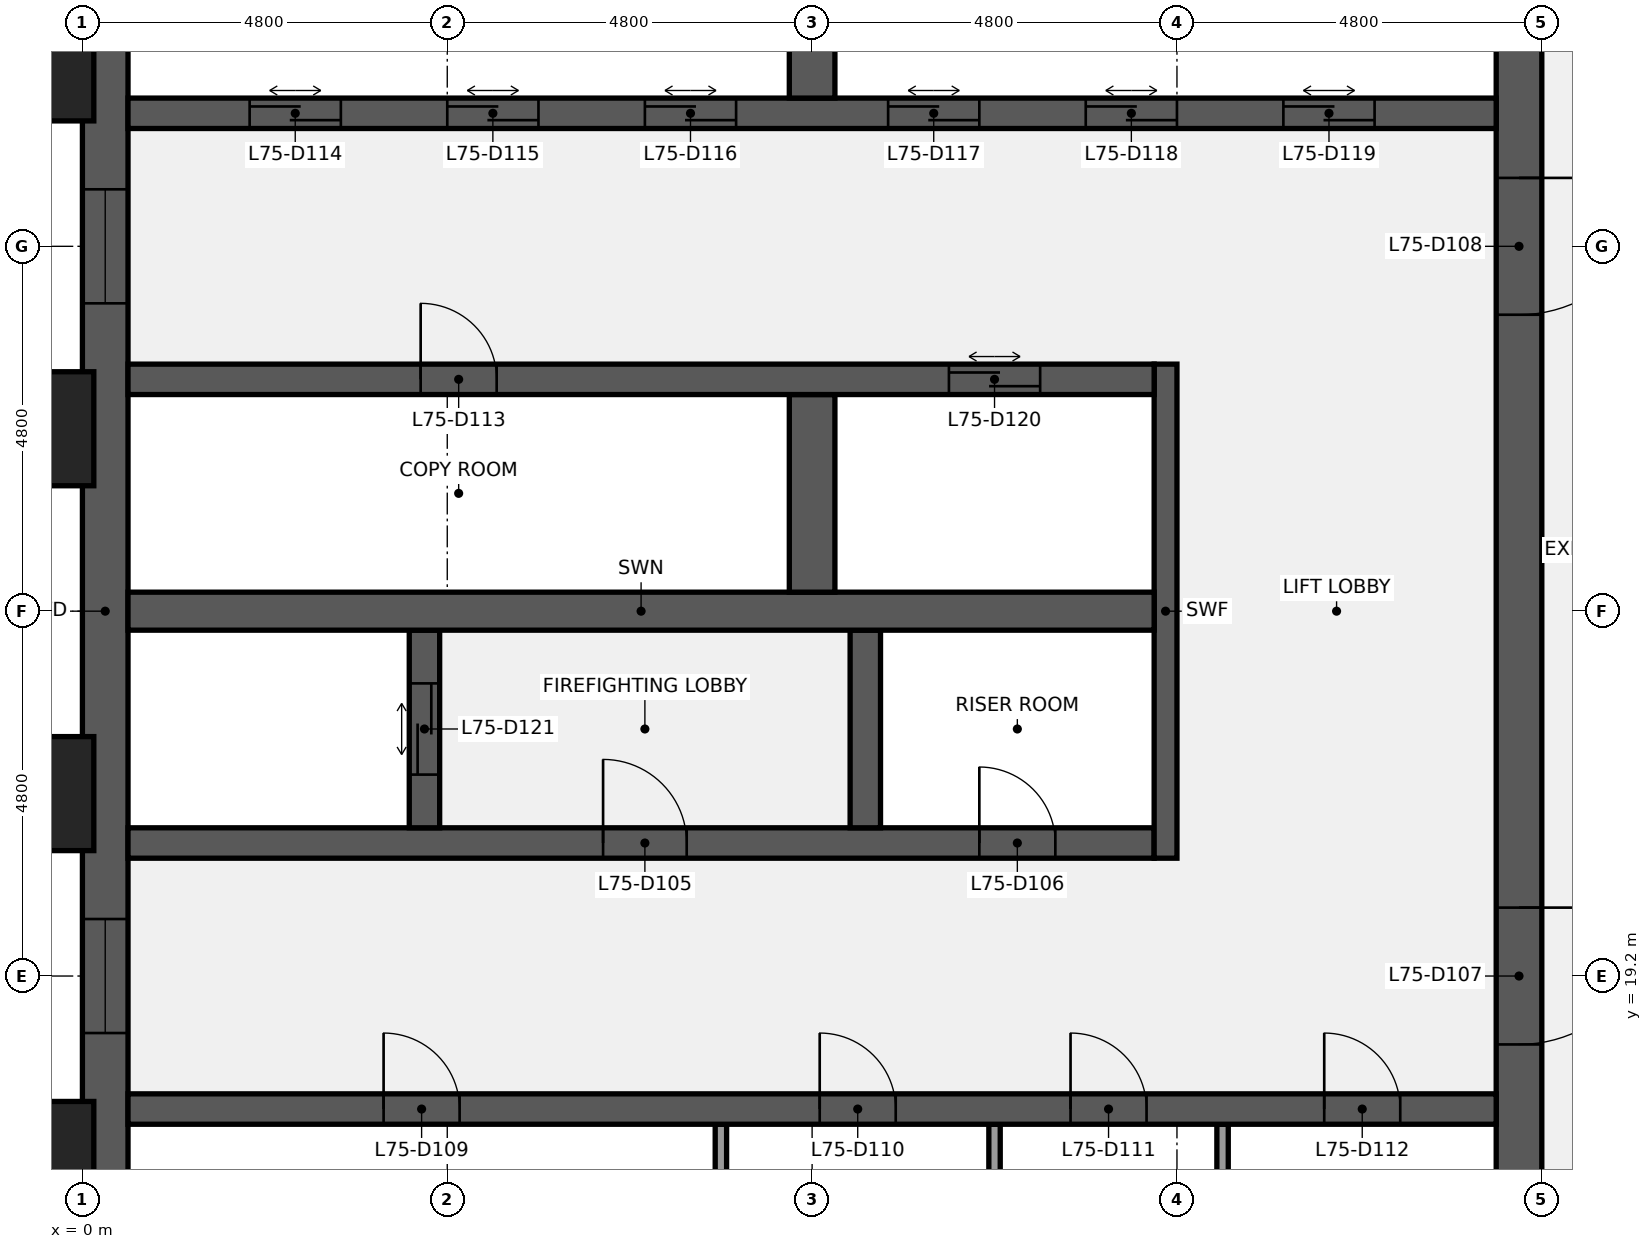
"""IFC4 building model, lengths in metres.
Left out: names, types, materials, properties, quantities, classifications, styles, units other than length and angle.
Written with IfcOpenShell. Run it as: python <this file> out.ifc"""

import sys

from ifc_helpers import new_model, si_unit, direction, frame, frame_2d, origin, origin_2d, place, context, subcontext, project, spatial, rectangle, extrude, element, fill, save


model = new_model("IFC4")
c1 = context("Model", 3, precision=1e-05, world=origin(), true_north=direction((0.0, 1.0)))
c2 = subcontext(c1, "Body", "Model", "MODEL_VIEW")
j1 = project(units=[si_unit("LENGTHUNIT", "METRE"), si_unit("PLANEANGLEUNIT", "RADIAN")], contexts=[c1])
p1 = place(None, origin())
s1 = spatial("IfcSite", under=j1, at=p1, CompositionType="ELEMENT")
p2 = place(p1, origin())
s2 = spatial("IfcBuilding", under=s1, at=p2, CompositionType="ELEMENT")
p3 = place(p2, frame((0.0, 0.0, 338.3)))
s3 = spatial("IfcBuildingStorey", under=s2, at=p3, CompositionType="ELEMENT", Elevation=338.3)
p4 = place(p3, frame((0.3, 9.6, 0.0), z_axis=(0.0, 0.0, 1.0), x_axis=(0.0, 1.0, 0.0)))
e1 = element("IfcWall", 1, at=p4, inside=s3, PredefinedType="SHEAR", context=c2, shape_type="SweptSolid", body=[
    extrude(rectangle(XDim=28.8, YDim=0.6, at=frame_2d((14.4, 0.0))), origin(), (0.0, 0.0, 1.0), 3.84),
])
p5 = place(p4, frame((8.85, 0.0, 0.9)))
e2 = element("IfcOpeningElement", 2, at=p5, cuts=e1, PredefinedType="OPENING", context=c2, shape_type="SweptSolid", body=[
    extrude(rectangle(XDim=1.5, YDim=1.5, at=frame_2d((0.75, 0.75))), frame((0.0, 0.31, 0.0), z_axis=(0.0, -1.0, 0.0), x_axis=(1.0, 0.0, 0.0)), (0.0, 0.0, 1.0), 0.62),
])
p6 = place(p4, frame((18.45, 0.0, 0.9)))
e3 = element("IfcOpeningElement", 3, at=p6, cuts=e1, PredefinedType="OPENING", context=c2, shape_type="SweptSolid", body=[
    extrude(rectangle(XDim=1.5, YDim=1.5, at=frame_2d((0.75, 0.75))), frame((0.0, 0.31, 0.0), z_axis=(0.0, -1.0, 0.0), x_axis=(1.0, 0.0, 0.0)), (0.0, 0.0, 1.0), 0.62),
])
p7 = place(p3, frame((18.9, 38.4, 0.0), z_axis=(0.0, 0.0, 1.0), x_axis=(0.0, -1.0, 0.0)))
e4 = element("IfcWall", 4, at=p7, inside=s3, PredefinedType="SHEAR", context=c2, shape_type="SweptSolid", body=[
    extrude(rectangle(XDim=28.8, YDim=0.6, at=frame_2d((14.4, 0.0))), origin(), (0.0, 0.0, 1.0), 3.84),
])
p8 = place(p7, frame((18.3, 0.0, 0.0)))
e5 = element("IfcOpeningElement", 5, at=p8, cuts=e4, PredefinedType="OPENING", context=c2, shape_type="SweptSolid", body=[
    extrude(rectangle(XDim=1.8, YDim=2.1, at=frame_2d((0.9, 1.05))), frame((0.0, 0.31, 0.0), z_axis=(0.0, -1.0, 0.0), x_axis=(1.0, 0.0, 0.0)), (0.0, 0.0, 1.0), 0.62),
])
p9 = place(p7, frame((8.7, 0.0, 0.0)))
e6 = element("IfcOpeningElement", 6, at=p9, cuts=e4, PredefinedType="OPENING", context=c2, shape_type="SweptSolid", body=[
    extrude(rectangle(XDim=1.8, YDim=2.1, at=frame_2d((0.9, 1.05))), frame((0.0, 0.31, 0.0), z_axis=(0.0, -1.0, 0.0), x_axis=(1.0, 0.0, 0.0)), (0.0, 0.0, 1.0), 0.62),
])
for number, where, z_axis, x_axis in (
    (7, (8.4, 14.65, 0.0), (0.0, 0.0, 1.0), (0.0, 1.0, 0.0)),
    (8, (12.0, 14.65, 0.0), (0.0, 0.0, 1.0), (0.0, 1.0, 0.0)),
    (9, (15.0, 14.65, 0.0), (0.0, 0.0, 1.0), (0.0, 1.0, 0.0)),
):
    element("IfcWall", number, at=place(p3, frame(where, z_axis=z_axis, x_axis=x_axis)), inside=s3, PredefinedType="PARTITIONING", context=c2, shape_type="SweptSolid", body=[
        extrude(rectangle(XDim=2.6, YDim=0.15, at=frame_2d((1.3, 0.0))), origin(), (0.0, 0.0, 1.0), 3.84),
    ])
p10 = place(p3, frame((0.6, 17.45, 0.0), z_axis=(0.0, 0.0, 1.0), x_axis=(1.0, 0.0, 0.0)))
e10 = element("IfcWall", 10, at=p10, inside=s3, PredefinedType="SHEAR", context=c2, shape_type="SweptSolid", body=[
    extrude(rectangle(XDim=18.0, YDim=0.4, at=frame_2d((9.0, 0.0))), origin(), (0.0, 0.0, 1.0), 3.84),
])
p11 = place(p10, frame((3.363, 0.0, 0.0)))
e11 = element("IfcOpeningElement", 11, at=p11, cuts=e10, PredefinedType="OPENING", context=c2, shape_type="SweptSolid", body=[
    extrude(rectangle(XDim=1.0, YDim=2.1, at=frame_2d((0.5, 1.05))), frame((0.0, 0.21, 0.0), z_axis=(0.0, -1.0, 0.0), x_axis=(1.0, 0.0, 0.0)), (0.0, 0.0, 1.0), 0.42),
])
p12 = place(p10, frame((9.1, 0.0, 0.0)))
e12 = element("IfcOpeningElement", 12, at=p12, cuts=e10, PredefinedType="OPENING", context=c2, shape_type="SweptSolid", body=[
    extrude(rectangle(XDim=1.0, YDim=2.1, at=frame_2d((0.5, 1.05))), frame((0.0, 0.21, 0.0), z_axis=(0.0, -1.0, 0.0), x_axis=(1.0, 0.0, 0.0)), (0.0, 0.0, 1.0), 0.42),
])
p13 = place(p10, frame((12.4, 0.0, 0.0)))
e13 = element("IfcOpeningElement", 13, at=p13, cuts=e10, PredefinedType="OPENING", context=c2, shape_type="SweptSolid", body=[
    extrude(rectangle(XDim=1.0, YDim=2.1, at=frame_2d((0.5, 1.05))), frame((0.0, 0.21, 0.0), z_axis=(0.0, -1.0, 0.0), x_axis=(1.0, 0.0, 0.0)), (0.0, 0.0, 1.0), 0.42),
])
p14 = place(p10, frame((15.738, 0.0, 0.0)))
e14 = element("IfcOpeningElement", 14, at=p14, cuts=e10, PredefinedType="OPENING", context=c2, shape_type="SweptSolid", body=[
    extrude(rectangle(XDim=1.0, YDim=2.1, at=frame_2d((0.5, 1.05))), frame((0.0, 0.21, 0.0), z_axis=(0.0, -1.0, 0.0), x_axis=(1.0, 0.0, 0.0)), (0.0, 0.0, 1.0), 0.42),
])
p15 = place(p3, frame((0.6, 20.95, 0.0), z_axis=(0.0, 0.0, 1.0), x_axis=(1.0, 0.0, 0.0)))
e15 = element("IfcWall", 15, at=p15, inside=s3, PredefinedType="SHEAR", context=c2, shape_type="SweptSolid", body=[
    extrude(rectangle(XDim=13.5, YDim=0.4, at=frame_2d((6.75, 0.0))), origin(), (0.0, 0.0, 1.0), 3.84),
])
p16 = place(p15, frame((6.25, 0.0, 0.0)))
e16 = element("IfcOpeningElement", 16, at=p16, cuts=e15, PredefinedType="OPENING", context=c2, shape_type="SweptSolid", body=[
    extrude(rectangle(XDim=1.1, YDim=2.1, at=frame_2d((0.55, 1.05))), frame((0.0, 0.21, 0.0), z_axis=(0.0, -1.0, 0.0), x_axis=(1.0, 0.0, 0.0)), (0.0, 0.0, 1.0), 0.42),
])
p17 = place(p15, frame((11.2, 0.0, 0.0)))
e17 = element("IfcOpeningElement", 17, at=p17, cuts=e15, PredefinedType="OPENING", context=c2, shape_type="SweptSolid", body=[
    extrude(rectangle(XDim=1.0, YDim=2.1, at=frame_2d((0.5, 1.05))), frame((0.0, 0.21, 0.0), z_axis=(0.0, -1.0, 0.0), x_axis=(1.0, 0.0, 0.0)), (0.0, 0.0, 1.0), 0.42),
])
p18 = place(p3, frame((14.25, 20.75, 0.0), z_axis=(0.0, 0.0, 1.0), x_axis=(0.0, 1.0, 0.0)))
e18 = element("IfcWall", 18, at=p18, inside=s3, PredefinedType="SHEAR", context=c2, shape_type="SweptSolid", body=[
    extrude(rectangle(XDim=6.5, YDim=0.3, at=frame_2d((3.25, 0.0))), origin(), (0.0, 0.0, 1.0), 3.84),
])
p19 = place(p3, frame((4.5, 21.15, 0.0), z_axis=(0.0, 0.0, 1.0), x_axis=(0.0, 1.0, 0.0)))
e19 = element("IfcWall", 19, at=p19, inside=s3, PredefinedType="SHEAR", context=c2, shape_type="SweptSolid", body=[
    extrude(rectangle(XDim=2.6, YDim=0.4, at=frame_2d((1.3, 0.0))), origin(), (0.0, 0.0, 1.0), 3.84),
])
p20 = place(p19, frame((0.7, 0.0, 0.0)))
e20 = element("IfcOpeningElement", 20, at=p20, cuts=e19, PredefinedType="OPENING", context=c2, shape_type="SweptSolid", body=[
    extrude(rectangle(XDim=1.2, YDim=2.1, at=frame_2d((0.6, 1.05))), frame((0.0, 0.21, 0.0), z_axis=(0.0, -1.0, 0.0), x_axis=(1.0, 0.0, 0.0)), (0.0, 0.0, 1.0), 0.42),
])
p21 = place(p3, frame((10.3, 21.15, 0.0), z_axis=(0.0, 0.0, 1.0), x_axis=(0.0, 1.0, 0.0)))
e21 = element("IfcWall", 21, at=p21, inside=s3, PredefinedType="SHEAR", context=c2, shape_type="SweptSolid", body=[
    extrude(rectangle(XDim=2.6, YDim=0.4, at=frame_2d((1.3, 0.0))), origin(), (0.0, 0.0, 1.0), 3.84),
])
p22 = place(p3, frame((0.6, 24.0, 0.0), z_axis=(0.0, 0.0, 1.0), x_axis=(1.0, 0.0, 0.0)))
e22 = element("IfcWall", 22, at=p22, inside=s3, PredefinedType="SHEAR", context=c2, shape_type="SweptSolid", body=[
    extrude(rectangle(XDim=13.5, YDim=0.5, at=frame_2d((6.75, 0.0))), origin(), (0.0, 0.0, 1.0), 3.84),
])
p23 = place(p3, frame((9.6, 24.25, 0.0), z_axis=(0.0, 0.0, 1.0), x_axis=(0.0, 1.0, 0.0)))
e23 = element("IfcWall", 23, at=p23, inside=s3, PredefinedType="SHEAR", context=c2, shape_type="SweptSolid", body=[
    extrude(rectangle(XDim=2.6, YDim=0.6, at=frame_2d((1.3, 0.0))), origin(), (0.0, 0.0, 1.0), 3.84),
])
p24 = place(p3, frame((0.6, 27.05, 0.0), z_axis=(0.0, 0.0, 1.0), x_axis=(1.0, 0.0, 0.0)))
e24 = element("IfcWall", 24, at=p24, inside=s3, PredefinedType="SHEAR", context=c2, shape_type="SweptSolid", body=[
    extrude(rectangle(XDim=13.5, YDim=0.4, at=frame_2d((6.75, 0.0))), origin(), (0.0, 0.0, 1.0), 3.84),
])
p25 = place(p24, frame((3.85, 0.0, 0.0)))
e25 = element("IfcOpeningElement", 25, at=p25, cuts=e24, PredefinedType="OPENING", context=c2, shape_type="SweptSolid", body=[
    extrude(rectangle(XDim=1.0, YDim=2.1, at=frame_2d((0.5, 1.05))), frame((0.0, 0.21, 0.0), z_axis=(0.0, -1.0, 0.0), x_axis=(1.0, 0.0, 0.0)), (0.0, 0.0, 1.0), 0.42),
])
p26 = place(p24, frame((10.8, 0.0, 0.0)))
e26 = element("IfcOpeningElement", 26, at=p26, cuts=e24, PredefinedType="OPENING", context=c2, shape_type="SweptSolid", body=[
    extrude(rectangle(XDim=1.2, YDim=2.1, at=frame_2d((0.6, 1.05))), frame((0.0, 0.21, 0.0), z_axis=(0.0, -1.0, 0.0), x_axis=(1.0, 0.0, 0.0)), (0.0, 0.0, 1.0), 0.42),
])
p27 = place(p3, frame((0.6, 30.55, 0.0), z_axis=(0.0, 0.0, 1.0), x_axis=(1.0, 0.0, 0.0)))
e27 = element("IfcWall", 27, at=p27, inside=s3, PredefinedType="SHEAR", context=c2, shape_type="SweptSolid", body=[
    extrude(rectangle(XDim=18.0, YDim=0.4, at=frame_2d((9.0, 0.0))), origin(), (0.0, 0.0, 1.0), 3.84),
])
p28 = place(p27, frame((1.6, 0.0, 0.0)))
e28 = element("IfcOpeningElement", 28, at=p28, cuts=e27, PredefinedType="OPENING", context=c2, shape_type="SweptSolid", body=[
    extrude(rectangle(XDim=1.2, YDim=2.1, at=frame_2d((0.6, 1.05))), frame((0.0, 0.21, 0.0), z_axis=(0.0, -1.0, 0.0), x_axis=(1.0, 0.0, 0.0)), (0.0, 0.0, 1.0), 0.42),
])
p29 = place(p27, frame((4.2, 0.0, 0.0)))
e29 = element("IfcOpeningElement", 29, at=p29, cuts=e27, PredefinedType="OPENING", context=c2, shape_type="SweptSolid", body=[
    extrude(rectangle(XDim=1.2, YDim=2.1, at=frame_2d((0.6, 1.05))), frame((0.0, 0.21, 0.0), z_axis=(0.0, -1.0, 0.0), x_axis=(1.0, 0.0, 0.0)), (0.0, 0.0, 1.0), 0.42),
])
p30 = place(p27, frame((6.8, 0.0, 0.0)))
e30 = element("IfcOpeningElement", 30, at=p30, cuts=e27, PredefinedType="OPENING", context=c2, shape_type="SweptSolid", body=[
    extrude(rectangle(XDim=1.2, YDim=2.1, at=frame_2d((0.6, 1.05))), frame((0.0, 0.21, 0.0), z_axis=(0.0, -1.0, 0.0), x_axis=(1.0, 0.0, 0.0)), (0.0, 0.0, 1.0), 0.42),
])
p31 = place(p27, frame((10.0, 0.0, 0.0)))
e31 = element("IfcOpeningElement", 31, at=p31, cuts=e27, PredefinedType="OPENING", context=c2, shape_type="SweptSolid", body=[
    extrude(rectangle(XDim=1.2, YDim=2.1, at=frame_2d((0.6, 1.05))), frame((0.0, 0.21, 0.0), z_axis=(0.0, -1.0, 0.0), x_axis=(1.0, 0.0, 0.0)), (0.0, 0.0, 1.0), 0.42),
])
p32 = place(p27, frame((12.6, 0.0, 0.0)))
e32 = element("IfcOpeningElement", 32, at=p32, cuts=e27, PredefinedType="OPENING", context=c2, shape_type="SweptSolid", body=[
    extrude(rectangle(XDim=1.2, YDim=2.1, at=frame_2d((0.6, 1.05))), frame((0.0, 0.21, 0.0), z_axis=(0.0, -1.0, 0.0), x_axis=(1.0, 0.0, 0.0)), (0.0, 0.0, 1.0), 0.42),
])
p33 = place(p27, frame((15.2, 0.0, 0.0)))
e33 = element("IfcOpeningElement", 33, at=p33, cuts=e27, PredefinedType="OPENING", context=c2, shape_type="SweptSolid", body=[
    extrude(rectangle(XDim=1.2, YDim=2.1, at=frame_2d((0.6, 1.05))), frame((0.0, 0.21, 0.0), z_axis=(0.0, -1.0, 0.0), x_axis=(1.0, 0.0, 0.0)), (0.0, 0.0, 1.0), 0.42),
])
p34 = place(p3, frame((9.6, 30.75, 0.0), z_axis=(0.0, 0.0, 1.0), x_axis=(0.0, 1.0, 0.0)))
e34 = element("IfcWall", 34, at=p34, inside=s3, PredefinedType="SHEAR", context=c2, shape_type="SweptSolid", body=[
    extrude(rectangle(XDim=2.6, YDim=0.6, at=frame_2d((1.3, 0.0))), origin(), (0.0, 0.0, 1.0), 3.84),
])
for number, where, z_axis, x_axis in (
    (35, (-0.75, 16.8, 0.0), (0.0, 0.0, 1.0), (0.0, 1.0, 0.0)),
    (36, (-0.75, 21.6, 0.0), (0.0, 0.0, 1.0), (0.0, 1.0, 0.0)),
    (37, (-0.75, 26.4, 0.0), (0.0, 0.0, 1.0), (0.0, 1.0, 0.0)),
    (38, (-0.75, 31.2, 0.0), (0.0, 0.0, 1.0), (0.0, 1.0, 0.0)),
):
    element("IfcColumn", number, at=place(p3, frame(where, z_axis=z_axis, x_axis=x_axis)), inside=s3, PredefinedType="PILASTER", context=c2, shape_type="SweptSolid", body=[
        extrude(rectangle(XDim=1.8, YDim=1.5, at=origin_2d()), origin(), (0.0, 0.0, 1.0), 4.0),
    ])
p35 = place(p16, origin())
e39 = element("IfcDoor", 39, at=p35, inside=s3, OperationType="SINGLE_SWING_LEFT", PredefinedType="DOOR", context=c2, shape_type="SweptSolid", body=[
    extrude(rectangle(XDim=1.1, YDim=2.1, at=frame_2d((0.55, 1.05))), frame((0.0, 0.025, 0.0), z_axis=(0.0, -1.0, 0.0), x_axis=(1.0, 0.0, 0.0)), (0.0, 0.0, 1.0), 0.05),
])
fill(e16, e39)
p36 = place(p17, origin())
e40 = element("IfcDoor", 40, at=p36, inside=s3, OperationType="SINGLE_SWING_LEFT", PredefinedType="DOOR", context=c2, shape_type="SweptSolid", body=[
    extrude(rectangle(XDim=1.0, YDim=2.1, at=frame_2d((0.5, 1.05))), frame((0.0, 0.025, 0.0), z_axis=(0.0, -1.0, 0.0), x_axis=(1.0, 0.0, 0.0)), (0.0, 0.0, 1.0), 0.05),
])
fill(e17, e40)
p37 = place(p8, origin())
e41 = element("IfcDoor", 41, at=p37, inside=s3, OperationType="DOUBLE_DOOR_SINGLE_SWING", PredefinedType="DOOR", context=c2, shape_type="SweptSolid", body=[
    extrude(rectangle(XDim=1.8, YDim=2.1, at=frame_2d((0.9, 1.05))), frame((0.0, 0.025, 0.0), z_axis=(0.0, -1.0, 0.0), x_axis=(1.0, 0.0, 0.0)), (0.0, 0.0, 1.0), 0.05),
])
fill(e5, e41)
p38 = place(p9, origin())
e42 = element("IfcDoor", 42, at=p38, inside=s3, OperationType="DOUBLE_DOOR_SINGLE_SWING", PredefinedType="DOOR", context=c2, shape_type="SweptSolid", body=[
    extrude(rectangle(XDim=1.8, YDim=2.1, at=frame_2d((0.9, 1.05))), frame((0.0, 0.025, 0.0), z_axis=(0.0, -1.0, 0.0), x_axis=(1.0, 0.0, 0.0)), (0.0, 0.0, 1.0), 0.05),
])
fill(e6, e42)
p39 = place(p11, origin())
e43 = element("IfcDoor", 43, at=p39, inside=s3, OperationType="SINGLE_SWING_LEFT", PredefinedType="DOOR", context=c2, shape_type="SweptSolid", body=[
    extrude(rectangle(XDim=1.0, YDim=2.1, at=frame_2d((0.5, 1.05))), frame((0.0, 0.025, 0.0), z_axis=(0.0, -1.0, 0.0), x_axis=(1.0, 0.0, 0.0)), (0.0, 0.0, 1.0), 0.05),
])
fill(e11, e43)
p40 = place(p12, origin())
e44 = element("IfcDoor", 44, at=p40, inside=s3, OperationType="SINGLE_SWING_LEFT", PredefinedType="DOOR", context=c2, shape_type="SweptSolid", body=[
    extrude(rectangle(XDim=1.0, YDim=2.1, at=frame_2d((0.5, 1.05))), frame((0.0, 0.025, 0.0), z_axis=(0.0, -1.0, 0.0), x_axis=(1.0, 0.0, 0.0)), (0.0, 0.0, 1.0), 0.05),
])
fill(e12, e44)
p41 = place(p13, origin())
e45 = element("IfcDoor", 45, at=p41, inside=s3, OperationType="SINGLE_SWING_LEFT", PredefinedType="DOOR", context=c2, shape_type="SweptSolid", body=[
    extrude(rectangle(XDim=1.0, YDim=2.1, at=frame_2d((0.5, 1.05))), frame((0.0, 0.025, 0.0), z_axis=(0.0, -1.0, 0.0), x_axis=(1.0, 0.0, 0.0)), (0.0, 0.0, 1.0), 0.05),
])
fill(e13, e45)
p42 = place(p14, origin())
e46 = element("IfcDoor", 46, at=p42, inside=s3, OperationType="SINGLE_SWING_LEFT", PredefinedType="DOOR", context=c2, shape_type="SweptSolid", body=[
    extrude(rectangle(XDim=1.0, YDim=2.1, at=frame_2d((0.5, 1.05))), frame((0.0, 0.025, 0.0), z_axis=(0.0, -1.0, 0.0), x_axis=(1.0, 0.0, 0.0)), (0.0, 0.0, 1.0), 0.05),
])
fill(e14, e46)
p43 = place(p25, origin())
e47 = element("IfcDoor", 47, at=p43, inside=s3, OperationType="SINGLE_SWING_LEFT", PredefinedType="DOOR", context=c2, shape_type="SweptSolid", body=[
    extrude(rectangle(XDim=1.0, YDim=2.1, at=frame_2d((0.5, 1.05))), frame((0.0, 0.025, 0.0), z_axis=(0.0, -1.0, 0.0), x_axis=(1.0, 0.0, 0.0)), (0.0, 0.0, 1.0), 0.05),
])
fill(e25, e47)
p44 = place(p28, origin())
e48 = element("IfcDoor", 48, at=p44, inside=s3, OperationType="DOUBLE_DOOR_SLIDING", PredefinedType="DOOR", context=c2, shape_type="SweptSolid", body=[
    extrude(rectangle(XDim=1.2, YDim=2.1, at=frame_2d((0.6, 1.05))), frame((0.0, 0.025, 0.0), z_axis=(0.0, -1.0, 0.0), x_axis=(1.0, 0.0, 0.0)), (0.0, 0.0, 1.0), 0.05),
])
fill(e28, e48)
p45 = place(p29, origin())
e49 = element("IfcDoor", 49, at=p45, inside=s3, OperationType="DOUBLE_DOOR_SLIDING", PredefinedType="DOOR", context=c2, shape_type="SweptSolid", body=[
    extrude(rectangle(XDim=1.2, YDim=2.1, at=frame_2d((0.6, 1.05))), frame((0.0, 0.025, 0.0), z_axis=(0.0, -1.0, 0.0), x_axis=(1.0, 0.0, 0.0)), (0.0, 0.0, 1.0), 0.05),
])
fill(e29, e49)
p46 = place(p30, origin())
e50 = element("IfcDoor", 50, at=p46, inside=s3, OperationType="DOUBLE_DOOR_SLIDING", PredefinedType="DOOR", context=c2, shape_type="SweptSolid", body=[
    extrude(rectangle(XDim=1.2, YDim=2.1, at=frame_2d((0.6, 1.05))), frame((0.0, 0.025, 0.0), z_axis=(0.0, -1.0, 0.0), x_axis=(1.0, 0.0, 0.0)), (0.0, 0.0, 1.0), 0.05),
])
fill(e30, e50)
p47 = place(p31, origin())
e51 = element("IfcDoor", 51, at=p47, inside=s3, OperationType="DOUBLE_DOOR_SLIDING", PredefinedType="DOOR", context=c2, shape_type="SweptSolid", body=[
    extrude(rectangle(XDim=1.2, YDim=2.1, at=frame_2d((0.6, 1.05))), frame((0.0, 0.025, 0.0), z_axis=(0.0, -1.0, 0.0), x_axis=(1.0, 0.0, 0.0)), (0.0, 0.0, 1.0), 0.05),
])
fill(e31, e51)
p48 = place(p32, origin())
e52 = element("IfcDoor", 52, at=p48, inside=s3, OperationType="DOUBLE_DOOR_SLIDING", PredefinedType="DOOR", context=c2, shape_type="SweptSolid", body=[
    extrude(rectangle(XDim=1.2, YDim=2.1, at=frame_2d((0.6, 1.05))), frame((0.0, 0.025, 0.0), z_axis=(0.0, -1.0, 0.0), x_axis=(1.0, 0.0, 0.0)), (0.0, 0.0, 1.0), 0.05),
])
fill(e32, e52)
p49 = place(p33, origin())
e53 = element("IfcDoor", 53, at=p49, inside=s3, OperationType="DOUBLE_DOOR_SLIDING", PredefinedType="DOOR", context=c2, shape_type="SweptSolid", body=[
    extrude(rectangle(XDim=1.2, YDim=2.1, at=frame_2d((0.6, 1.05))), frame((0.0, 0.025, 0.0), z_axis=(0.0, -1.0, 0.0), x_axis=(1.0, 0.0, 0.0)), (0.0, 0.0, 1.0), 0.05),
])
fill(e33, e53)
p50 = place(p26, origin())
e54 = element("IfcDoor", 54, at=p50, inside=s3, OperationType="DOUBLE_DOOR_SLIDING", PredefinedType="DOOR", context=c2, shape_type="SweptSolid", body=[
    extrude(rectangle(XDim=1.2, YDim=2.1, at=frame_2d((0.6, 1.05))), frame((0.0, 0.025, 0.0), z_axis=(0.0, -1.0, 0.0), x_axis=(1.0, 0.0, 0.0)), (0.0, 0.0, 1.0), 0.05),
])
fill(e26, e54)
p51 = place(p20, origin())
e55 = element("IfcDoor", 55, at=p51, inside=s3, OperationType="DOUBLE_DOOR_SLIDING", PredefinedType="DOOR", context=c2, shape_type="SweptSolid", body=[
    extrude(rectangle(XDim=1.2, YDim=2.1, at=frame_2d((0.6, 1.05))), frame((0.0, 0.025, 0.0), z_axis=(0.0, -1.0, 0.0), x_axis=(1.0, 0.0, 0.0)), (0.0, 0.0, 1.0), 0.05),
])
fill(e20, e55)
p52 = place(p5, origin())
e56 = element("IfcWindow", 56, at=p52, inside=s3, PartitioningType="SINGLE_PANEL", PredefinedType="WINDOW", context=c2, shape_type="SweptSolid", body=[
    extrude(rectangle(XDim=1.5, YDim=1.5, at=frame_2d((0.75, 0.75))), frame((0.0, 0.03, 0.0), z_axis=(0.0, -1.0, 0.0), x_axis=(1.0, 0.0, 0.0)), (0.0, 0.0, 1.0), 0.06),
])
fill(e2, e56)
p53 = place(p6, origin())
e57 = element("IfcWindow", 57, at=p53, inside=s3, PartitioningType="SINGLE_PANEL", PredefinedType="WINDOW", context=c2, shape_type="SweptSolid", body=[
    extrude(rectangle(XDim=1.5, YDim=1.5, at=frame_2d((0.75, 0.75))), frame((0.0, 0.03, 0.0), z_axis=(0.0, -1.0, 0.0), x_axis=(1.0, 0.0, 0.0)), (0.0, 0.0, 1.0), 0.06),
])
fill(e3, e57)
save(model, sys.argv[1])
